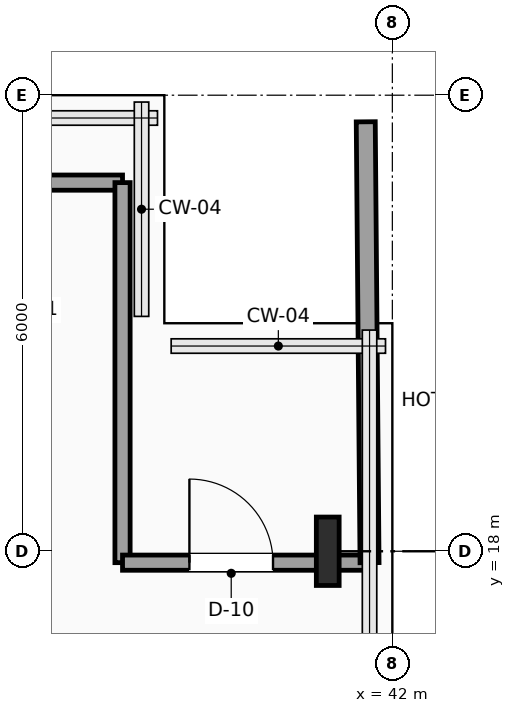
"""IFC4 building model, lengths in metres.
Left out: names, types, materials, properties, quantities, classifications, styles, units other than length and angle.
Written with IfcOpenShell. Run it as: python <this file> out.ifc"""

import sys

from ifc_helpers import new_model, si_unit, direction, frame, frame_2d, origin, origin_2d, place, context, subcontext, project, spatial, rectangle, i_section, extrude, element, fill, save


model = new_model("IFC4")
c1 = context("Model", 3, precision=1e-05, world=origin(), true_north=direction((0.0, 1.0)))
c2 = subcontext(c1, "Body", "Model", "MODEL_VIEW")
j1 = project(units=[si_unit("LENGTHUNIT", "METRE"), si_unit("PLANEANGLEUNIT", "RADIAN")], contexts=[c1])
p1 = place(None, origin())
s1 = spatial("IfcSite", under=j1, at=p1, CompositionType="ELEMENT")
p2 = place(p1, origin())
s2 = spatial("IfcBuilding", under=s1, at=p2, CompositionType="ELEMENT")
p3 = place(p2, frame((0.0, 0.0, 180.45)))
s3 = spatial("IfcBuildingStorey", under=s2, at=p3, CompositionType="ELEMENT", Elevation=180.45)
p4 = place(p3, frame((41.15, 18.0, 0.0), z_axis=(0.0, 0.0, 1.0), x_axis=(1.0, 0.0, 0.0)))
e1 = element("IfcColumn", 1, at=p4, inside=s3, PredefinedType="COLUMN", context=c2, shape_type="SweptSolid", body=[
    extrude(i_section(OverallWidth=0.3, OverallDepth=0.9, WebThickness=0.019, FlangeThickness=0.035, FilletRadius=0.03, at=origin_2d()), origin(), (0.0, 0.0, 1.0), 3.75),
])
p5 = place(p3, frame((36.35, 22.85, 0.0), z_axis=(0.0, 0.0, 1.0), x_axis=(1.0, 0.0, 0.0)))
e2 = element("IfcWall", 2, at=p5, inside=s3, PredefinedType="SOLIDWALL", context=c2, shape_type="SweptSolid", body=[
    extrude(rectangle(XDim=2.1, YDim=0.2, at=frame_2d((1.05, 0.0))), origin(), (0.0, 0.0, 1.0), 3.54),
])
p6 = place(p3, frame((38.45, 22.85, 0.0), z_axis=(0.0, 0.0, 1.0), x_axis=(0.0, -1.0, 0.0)))
e3 = element("IfcWall", 3, at=p6, inside=s3, PredefinedType="SOLIDWALL", context=c2, shape_type="SweptSolid", body=[
    extrude(rectangle(XDim=5.0, YDim=0.2, at=frame_2d((2.5, 0.0))), origin(), (0.0, 0.0, 1.0), 3.54),
])
p7 = place(p3, frame((38.45, 17.85, 0.0), z_axis=(0.0, 0.0, 1.0), x_axis=(1.0, 0.0, 0.0)))
e4 = element("IfcWall", 4, at=p7, inside=s3, PredefinedType="SOLIDWALL", context=c2, shape_type="SweptSolid", body=[
    extrude(rectangle(XDim=3.25, YDim=0.2, at=frame_2d((1.625, 0.0))), origin(), (0.0, 0.0, 1.0), 3.132),
])
p8 = place(p7, frame((0.88, 0.0, 0.0)))
e5 = element("IfcOpeningElement", 5, at=p8, cuts=e4, PredefinedType="OPENING", context=c2, shape_type="SweptSolid", body=[
    extrude(rectangle(XDim=1.1, YDim=2.25, at=frame_2d((0.55, 1.125))), frame((0.0, 0.11, 0.0), z_axis=(0.0, -1.0, 0.0), x_axis=(1.0, 0.0, 0.0)), (0.0, 0.0, 1.0), 0.22),
])
p9 = place(p3, frame((41.7, 17.85, 0.0), z_axis=(0.0, 0.0, 1.0), x_axis=(-0.008629077606, 0.999962768817, 0.0)))
e6 = element("IfcWall", 6, at=p9, inside=s3, PredefinedType="PARTITIONING", context=c2, shape_type="SweptSolid", body=[
    extrude(rectangle(XDim=5.8, YDim=0.25, at=frame_2d((2.9, 0.0))), origin(), (0.0, 0.0, 1.0), 3.54),
])
p10 = place(p8, origin())
e7 = element("IfcDoor", 7, at=p10, inside=s3, OperationType="SINGLE_SWING_LEFT", PredefinedType="DOOR", context=c2, shape_type="SweptSolid", body=[
    extrude(rectangle(XDim=1.1, YDim=2.25, at=frame_2d((0.55, 1.125))), frame((0.0, 0.025, 0.0), z_axis=(0.0, -1.0, 0.0), x_axis=(1.0, 0.0, 0.0)), (0.0, 0.0, 1.0), 0.05),
])
fill(e5, e7)
save(model, sys.argv[1])
